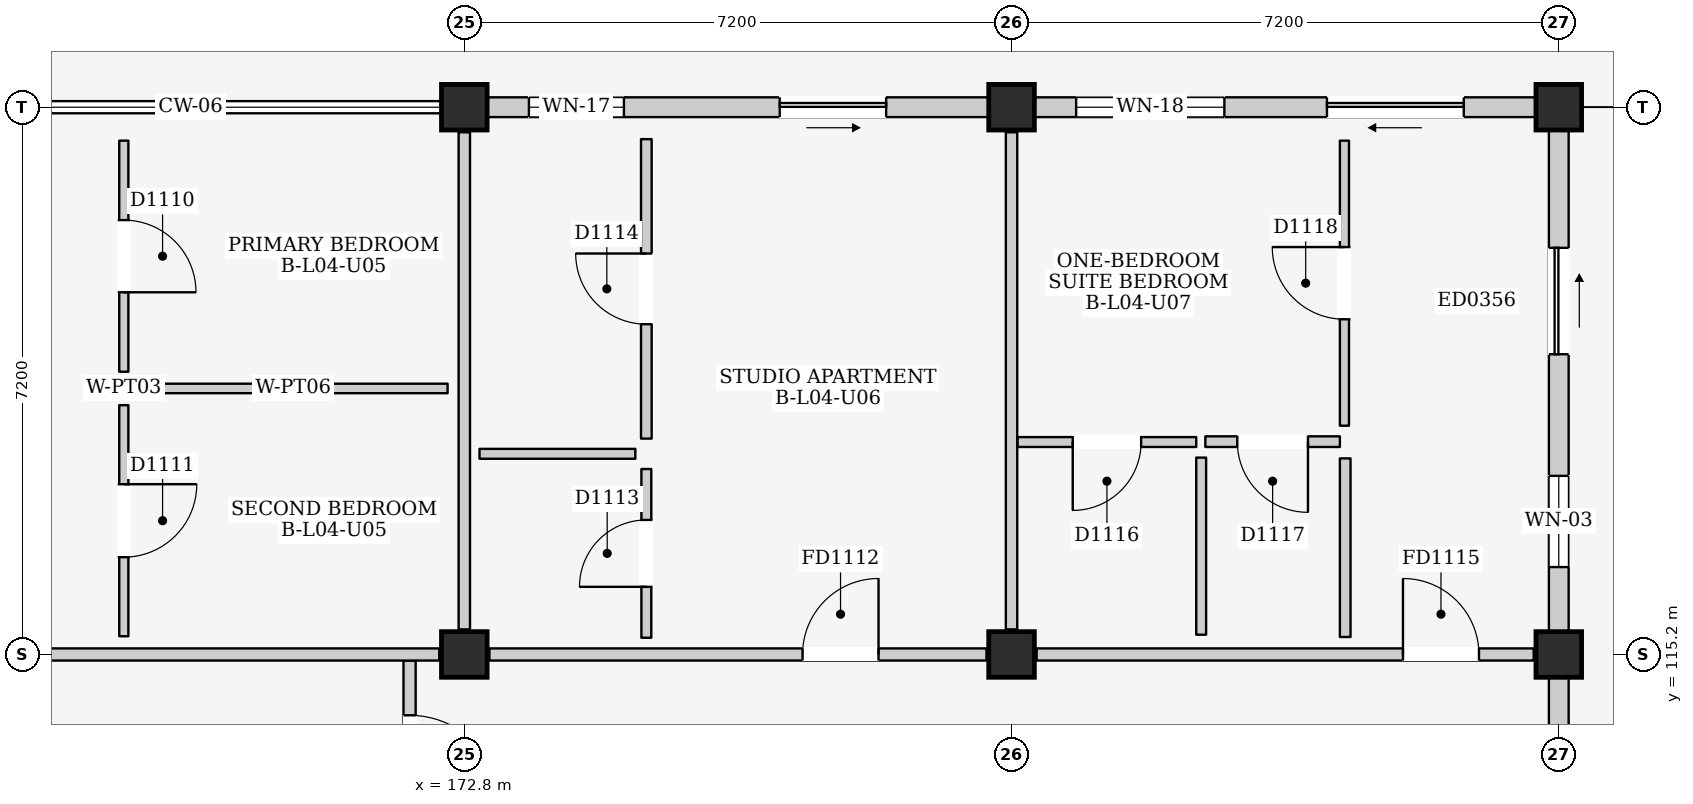
"""IFC4 building model, lengths in metres.
Left out: names, types, materials, properties, quantities, classifications, styles, units other than length and angle.
Written with IfcOpenShell. Run it as: python <this file> out.ifc"""

import sys

from ifc_helpers import new_model, si_unit, direction, frame, frame_2d, origin, origin_2d, place, context, subcontext, project, spatial, rectangle, extrude, element, fill, save


model = new_model("IFC4")
c1 = context("Model", 3, precision=1e-05, world=origin(), true_north=direction((0.0, 1.0)))
c2 = subcontext(c1, "Body", "Model", "MODEL_VIEW")
j1 = project(units=[si_unit("LENGTHUNIT", "METRE"), si_unit("PLANEANGLEUNIT", "RADIAN")], contexts=[c1])
p1 = place(None, origin())
s1 = spatial("IfcSite", under=j1, at=p1, CompositionType="ELEMENT")
p2 = place(p1, origin())
s2 = spatial("IfcBuilding", under=s1, at=p2, CompositionType="ELEMENT")
p3 = place(p2, frame((0.0, 0.0, 15.4)))
s3 = spatial("IfcBuildingStorey", under=s2, at=p3, CompositionType="ELEMENT", Elevation=15.4)
for number, where, z_axis, x_axis in (
    (1, (172.8, 115.2, 0.0), (0.0, 0.0, 1.0), (1.0, 0.0, 0.0)),
    (2, (172.8, 122.4, 0.0), (0.0, 0.0, 1.0), (1.0, 0.0, 0.0)),
    (3, (180.0, 115.2, 0.0), (0.0, 0.0, 1.0), (1.0, 0.0, 0.0)),
    (4, (180.0, 122.4, 0.0), (0.0, 0.0, 1.0), (1.0, 0.0, 0.0)),
    (5, (187.2, 115.2, 0.0), (0.0, 0.0, 1.0), (1.0, 0.0, 0.0)),
    (6, (187.2, 122.4, 0.0), (0.0, 0.0, 1.0), (1.0, 0.0, 0.0)),
):
    element("IfcColumn", number, at=place(p3, frame(where, z_axis=z_axis, x_axis=x_axis)), inside=s3, PredefinedType="COLUMN", context=c2, shape_type="SweptSolid", body=[
        extrude(rectangle(XDim=0.6, YDim=0.6, at=origin_2d()), origin(), (0.0, 0.0, 1.0), 3.2),
    ])
p4 = place(p3, frame((173.1, 122.4, 0.0), z_axis=(0.0, 0.0, 1.0), x_axis=(1.0, 0.0, 0.0)))
e7 = element("IfcWall", 7, at=p4, inside=s3, PredefinedType="ELEMENTEDWALL", context=c2, shape_type="SweptSolid", body=[
    extrude(rectangle(XDim=6.6, YDim=0.26, at=frame_2d((3.3, 0.0))), origin(), (0.0, 0.0, 1.0), 2.43),
])
p5 = place(p4, frame((3.85, 0.0, 0.0)))
e8 = element("IfcOpeningElement", 8, at=p5, cuts=e7, PredefinedType="OPENING", context=c2, shape_type="SweptSolid", body=[
    extrude(rectangle(XDim=1.4, YDim=2.1, at=frame_2d((0.7, 1.05))), frame((0.0, 0.145, 0.0), z_axis=(0.0, -1.0, 0.0), x_axis=(1.0, 0.0, 0.0)), (0.0, 0.0, 1.0), 0.29),
])
p6 = place(p4, frame((0.55, 0.0, 0.9)))
e9 = element("IfcOpeningElement", 9, at=p6, cuts=e7, PredefinedType="OPENING", context=c2, shape_type="SweptSolid", body=[
    extrude(rectangle(XDim=1.25, YDim=1.3, at=frame_2d((0.625, 0.65))), frame((0.0, 0.145, 0.0), z_axis=(0.0, -1.0, 0.0), x_axis=(1.0, 0.0, 0.0)), (0.0, 0.0, 1.0), 0.29),
])
p7 = place(p3, frame((187.2, 108.3, 0.0), z_axis=(0.0, 0.0, 1.0), x_axis=(0.0, 1.0, 0.0)))
e10 = element("IfcWall", 10, at=p7, inside=s3, PredefinedType="ELEMENTEDWALL", context=c2, shape_type="SweptSolid", body=[
    extrude(rectangle(XDim=6.6, YDim=0.26, at=frame_2d((3.3, 0.0))), origin(), (0.0, 0.0, 1.0), 2.43),
])
p8 = place(p7, frame((3.65, 0.0, 0.0)))
e11 = element("IfcOpeningElement", 11, at=p8, cuts=e10, PredefinedType="OPENING", context=c2, shape_type="SweptSolid", body=[
    extrude(rectangle(XDim=1.4, YDim=2.1, at=frame_2d((0.7, 1.05))), frame((0.0, 0.145, 0.0), z_axis=(0.0, -1.0, 0.0), x_axis=(1.0, 0.0, 0.0)), (0.0, 0.0, 1.0), 0.29),
])
p9 = place(p3, frame((180.3, 122.4, 0.0), z_axis=(0.0, 0.0, 1.0), x_axis=(1.0, 0.0, 0.0)))
e12 = element("IfcWall", 12, at=p9, inside=s3, PredefinedType="ELEMENTEDWALL", context=c2, shape_type="SweptSolid", body=[
    extrude(rectangle(XDim=6.6, YDim=0.26, at=frame_2d((3.3, 0.0))), origin(), (0.0, 0.0, 1.0), 2.43),
])
p10 = place(p9, frame((3.85, 0.0, 0.0)))
e13 = element("IfcOpeningElement", 13, at=p10, cuts=e12, PredefinedType="OPENING", context=c2, shape_type="SweptSolid", body=[
    extrude(rectangle(XDim=1.8, YDim=2.12, at=frame_2d((0.9, 1.06))), frame((0.0, 0.145, 0.0), z_axis=(0.0, -1.0, 0.0), x_axis=(1.0, 0.0, 0.0)), (0.0, 0.0, 1.0), 0.29),
])
p11 = place(p9, frame((0.55, 0.0, 0.76)))
e14 = element("IfcOpeningElement", 14, at=p11, cuts=e12, PredefinedType="OPENING", context=c2, shape_type="SweptSolid", body=[
    extrude(rectangle(XDim=1.95, YDim=1.55, at=frame_2d((0.975, 0.775))), frame((0.0, 0.145, 0.0), z_axis=(0.0, -1.0, 0.0), x_axis=(1.0, 0.0, 0.0)), (0.0, 0.0, 1.0), 0.29),
])
p12 = place(p3, frame((187.2, 115.5, 0.0), z_axis=(0.0, 0.0, 1.0), x_axis=(0.0, 1.0, 0.0)))
e15 = element("IfcWall", 15, at=p12, inside=s3, PredefinedType="ELEMENTEDWALL", context=c2, shape_type="SweptSolid", body=[
    extrude(rectangle(XDim=6.6, YDim=0.26, at=frame_2d((3.3, 0.0))), origin(), (0.0, 0.0, 1.0), 2.43),
])
p13 = place(p12, frame((3.65, 0.0, 0.0)))
e16 = element("IfcOpeningElement", 16, at=p13, cuts=e15, PredefinedType="OPENING", context=c2, shape_type="SweptSolid", body=[
    extrude(rectangle(XDim=1.4, YDim=2.1, at=frame_2d((0.7, 1.05))), frame((0.0, 0.145, 0.0), z_axis=(0.0, -1.0, 0.0), x_axis=(1.0, 0.0, 0.0)), (0.0, 0.0, 1.0), 0.29),
])
p14 = place(p12, frame((0.85, 0.0, 0.95)))
e17 = element("IfcOpeningElement", 17, at=p14, cuts=e15, PredefinedType="OPENING", context=c2, shape_type="SweptSolid", body=[
    extrude(rectangle(XDim=1.2, YDim=1.35, at=frame_2d((0.6, 0.675))), frame((0.0, 0.145, 0.0), z_axis=(0.0, -1.0, 0.0), x_axis=(1.0, 0.0, 0.0)), (0.0, 0.0, 1.0), 0.29),
])
p15 = place(p3, frame((172.08, 110.8, 0.0), z_axis=(0.0, 0.0, 1.0), x_axis=(0.0, 1.0, 0.0)))
e18 = element("IfcWall", 18, at=p15, inside=s3, PredefinedType="PARTITIONING", context=c2, shape_type="SweptSolid", body=[
    extrude(rectangle(XDim=4.32, YDim=0.16, at=frame_2d((2.16, 0.0))), origin(), (0.0, 0.0, 1.0), 2.95),
])
p16 = place(p15, frame((2.4, 0.0, 0.0)))
e19 = element("IfcOpeningElement", 19, at=p16, cuts=e18, PredefinedType="OPENING", context=c2, shape_type="SweptSolid", body=[
    extrude(rectangle(XDim=1.2, YDim=2.2, at=frame_2d((0.6, 1.1))), frame((0.0, 0.095, 0.0), z_axis=(0.0, -1.0, 0.0), x_axis=(1.0, 0.0, 0.0)), (0.0, 0.0, 1.0), 0.19),
])
p17 = place(p3, frame((165.93, 115.2, 0.0), z_axis=(0.0, 0.0, 1.0), x_axis=(1.0, 0.0, 0.0)))
e20 = element("IfcWall", 20, at=p17, inside=s3, PredefinedType="PARTITIONING", context=c2, shape_type="SweptSolid", body=[
    extrude(rectangle(XDim=6.54, YDim=0.16, at=frame_2d((3.27, 0.0))), origin(), (0.0, 0.0, 1.0), 2.335),
])
p18 = place(p3, frame((172.8, 115.53, 0.0), z_axis=(0.0, 0.0, 1.0), x_axis=(0.0, 1.0, 0.0)))
e21 = element("IfcWall", 21, at=p18, inside=s3, PredefinedType="PARTITIONING", context=c2, shape_type="SweptSolid", body=[
    extrude(rectangle(XDim=6.54, YDim=0.15, at=frame_2d((3.27, 0.0))), origin(), (0.0, 0.0, 1.0), 2.385),
])
p19 = place(p3, frame((168.32, 118.92, 0.0), z_axis=(0.0, 0.0, 1.0), x_axis=(0.0, 1.0, 0.0)))
e22 = element("IfcWall", 22, at=p19, inside=s3, PredefinedType="PARTITIONING", context=c2, shape_type="SweptSolid", body=[
    extrude(rectangle(XDim=3.04, YDim=0.12, at=frame_2d((1.52, 0.0))), origin(), (0.0, 0.0, 1.0), 2.95),
])
p20 = place(p19, frame((1.045, 0.0, 0.0)))
e23 = element("IfcOpeningElement", 23, at=p20, cuts=e22, PredefinedType="OPENING", context=c2, shape_type="SweptSolid", body=[
    extrude(rectangle(XDim=0.95, YDim=2.15, at=frame_2d((0.475, 1.075))), frame((0.0, 0.075, 0.0), z_axis=(0.0, -1.0, 0.0), x_axis=(1.0, 0.0, 0.0)), (0.0, 0.0, 1.0), 0.15),
])
p21 = place(p3, frame((168.52, 118.7, 0.0), z_axis=(0.0, 0.0, 1.0), x_axis=(1.0, 0.0, 0.0)))
e24 = element("IfcWall", 24, at=p21, inside=s3, PredefinedType="PARTITIONING", context=c2, shape_type="SweptSolid", body=[
    extrude(rectangle(XDim=4.06, YDim=0.125, at=frame_2d((2.03, 0.0))), origin(), (0.0, 0.0, 1.0), 2.95),
])
p22 = place(p3, frame((168.32, 115.44, 0.0), z_axis=(0.0, 0.0, 1.0), x_axis=(0.0, 1.0, 0.0)))
e25 = element("IfcWall", 25, at=p22, inside=s3, PredefinedType="PARTITIONING", context=c2, shape_type="SweptSolid", body=[
    extrude(rectangle(XDim=3.04, YDim=0.12, at=frame_2d((1.52, 0.0))), origin(), (0.0, 0.0, 1.0), 2.95),
])
p23 = place(p22, frame((1.04, 0.0, 0.0)))
e26 = element("IfcOpeningElement", 26, at=p23, cuts=e25, PredefinedType="OPENING", context=c2, shape_type="SweptSolid", body=[
    extrude(rectangle(XDim=0.96, YDim=2.15, at=frame_2d((0.48, 1.075))), frame((0.0, 0.075, 0.0), z_axis=(0.0, -1.0, 0.0), x_axis=(1.0, 0.0, 0.0)), (0.0, 0.0, 1.0), 0.15),
])
p24 = place(p3, frame((173.13, 115.2, 0.0), z_axis=(0.0, 0.0, 1.0), x_axis=(1.0, 0.0, 0.0)))
e27 = element("IfcWall", 27, at=p24, inside=s3, PredefinedType="PARTITIONING", context=c2, shape_type="SweptSolid", body=[
    extrude(rectangle(XDim=6.54, YDim=0.16, at=frame_2d((3.27, 0.0))), origin(), (0.0, 0.0, 1.0), 2.335),
])
p25 = place(p24, frame((4.12, 0.0, 0.0)))
e28 = element("IfcOpeningElement", 28, at=p25, cuts=e27, PredefinedType="OPENING", context=c2, shape_type="SweptSolid", body=[
    extrude(rectangle(XDim=1.0, YDim=2.15, at=frame_2d((0.5, 1.075))), frame((0.0, 0.095, 0.0), z_axis=(0.0, -1.0, 0.0), x_axis=(1.0, 0.0, 0.0)), (0.0, 0.0, 1.0), 0.19),
])
p26 = place(p3, frame((180.0, 115.53, 0.0), z_axis=(0.0, 0.0, 1.0), x_axis=(0.0, 1.0, 0.0)))
e29 = element("IfcWall", 29, at=p26, inside=s3, PredefinedType="PARTITIONING", context=c2, shape_type="SweptSolid", body=[
    extrude(rectangle(XDim=6.54, YDim=0.15, at=frame_2d((3.27, 0.0))), origin(), (0.0, 0.0, 1.0), 2.385),
])
p27 = place(p3, frame((173.0, 117.84, 0.0), z_axis=(0.0, 0.0, 1.0), x_axis=(1.0, 0.0, 0.0)))
e30 = element("IfcWall", 30, at=p27, inside=s3, PredefinedType="PARTITIONING", context=c2, shape_type="SweptSolid", body=[
    extrude(rectangle(XDim=2.05, YDim=0.13, at=frame_2d((1.025, 0.0))), origin(), (0.0, 0.0, 1.0), 2.95),
])
p28 = place(p3, frame((175.195, 115.42, 0.0), z_axis=(0.0, 0.0, 1.0), x_axis=(0.0, 1.0, 0.0)))
e31 = element("IfcWall", 31, at=p28, inside=s3, PredefinedType="PARTITIONING", context=c2, shape_type="SweptSolid", body=[
    extrude(rectangle(XDim=2.22, YDim=0.13, at=frame_2d((1.11, 0.0))), origin(), (0.0, 0.0, 1.0), 2.95),
])
p29 = place(p28, frame((0.67, 0.0, 0.0)))
e32 = element("IfcOpeningElement", 32, at=p29, cuts=e31, PredefinedType="OPENING", context=c2, shape_type="SweptSolid", body=[
    extrude(rectangle(XDim=0.88, YDim=2.1, at=frame_2d((0.44, 1.05))), frame((0.0, 0.08, 0.0), z_axis=(0.0, -1.0, 0.0), x_axis=(1.0, 0.0, 0.0)), (0.0, 0.0, 1.0), 0.16),
])
p30 = place(p3, frame((175.195, 118.04, 0.0), z_axis=(0.0, 0.0, 1.0), x_axis=(0.0, 1.0, 0.0)))
e33 = element("IfcWall", 33, at=p30, inside=s3, PredefinedType="PARTITIONING", context=c2, shape_type="SweptSolid", body=[
    extrude(rectangle(XDim=3.94, YDim=0.14, at=frame_2d((1.97, 0.0))), origin(), (0.0, 0.0, 1.0), 2.95),
])
p31 = place(p30, frame((1.505, 0.0, 0.0)))
e34 = element("IfcOpeningElement", 34, at=p31, cuts=e33, PredefinedType="OPENING", context=c2, shape_type="SweptSolid", body=[
    extrude(rectangle(XDim=0.93, YDim=2.14, at=frame_2d((0.465, 1.07))), frame((0.0, 0.085, 0.0), z_axis=(0.0, -1.0, 0.0), x_axis=(1.0, 0.0, 0.0)), (0.0, 0.0, 1.0), 0.17),
])
p32 = place(p3, frame((180.33, 115.2, 0.0), z_axis=(0.0, 0.0, 1.0), x_axis=(1.0, 0.0, 0.0)))
e35 = element("IfcWall", 35, at=p32, inside=s3, PredefinedType="PARTITIONING", context=c2, shape_type="SweptSolid", body=[
    extrude(rectangle(XDim=6.54, YDim=0.16, at=frame_2d((3.27, 0.0))), origin(), (0.0, 0.0, 1.0), 2.335),
])
p33 = place(p32, frame((4.82, 0.0, 0.0)))
e36 = element("IfcOpeningElement", 36, at=p33, cuts=e35, PredefinedType="OPENING", context=c2, shape_type="SweptSolid", body=[
    extrude(rectangle(XDim=1.0, YDim=2.15, at=frame_2d((0.5, 1.075))), frame((0.0, 0.095, 0.0), z_axis=(0.0, -1.0, 0.0), x_axis=(1.0, 0.0, 0.0)), (0.0, 0.0, 1.0), 0.19),
])
p34 = place(p3, frame((180.08, 117.995, 0.0), z_axis=(0.0, 0.0, 1.0), x_axis=(1.0, 0.0, 0.0)))
e37 = element("IfcWall", 37, at=p34, inside=s3, PredefinedType="PARTITIONING", context=c2, shape_type="SweptSolid", body=[
    extrude(rectangle(XDim=2.35, YDim=0.13, at=frame_2d((1.175, 0.0))), origin(), (0.0, 0.0, 1.0), 2.95),
])
p35 = place(p34, frame((0.725, 0.0, 0.0)))
e38 = element("IfcOpeningElement", 38, at=p35, cuts=e37, PredefinedType="OPENING", context=c2, shape_type="SweptSolid", body=[
    extrude(rectangle(XDim=0.9, YDim=2.1, at=frame_2d((0.45, 1.05))), frame((0.0, 0.08, 0.0), z_axis=(0.0, -1.0, 0.0), x_axis=(1.0, 0.0, 0.0)), (0.0, 0.0, 1.0), 0.16),
])
p36 = place(p3, frame((182.495, 115.46, 0.0), z_axis=(0.0, 0.0, 1.0), x_axis=(0.0, 1.0, 0.0)))
e39 = element("IfcWall", 39, at=p36, inside=s3, PredefinedType="PARTITIONING", context=c2, shape_type="SweptSolid", body=[
    extrude(rectangle(XDim=2.33, YDim=0.13, at=frame_2d((1.165, 0.0))), origin(), (0.0, 0.0, 1.0), 2.95),
])
p37 = place(p3, frame((182.55, 118.0, 0.0), z_axis=(0.0, 0.0, 1.0), x_axis=(1.0, 0.0, 0.0)))
e40 = element("IfcWall", 40, at=p37, inside=s3, PredefinedType="PARTITIONING", context=c2, shape_type="SweptSolid", body=[
    extrude(rectangle(XDim=1.77, YDim=0.14, at=frame_2d((0.885, 0.0))), origin(), (0.0, 0.0, 1.0), 2.95),
])
p38 = place(p37, frame((0.42, 0.0, 0.0)))
e41 = element("IfcOpeningElement", 41, at=p38, cuts=e40, PredefinedType="OPENING", context=c2, shape_type="SweptSolid", body=[
    extrude(rectangle(XDim=0.93, YDim=2.14, at=frame_2d((0.465, 1.07))), frame((0.0, 0.085, 0.0), z_axis=(0.0, -1.0, 0.0), x_axis=(1.0, 0.0, 0.0)), (0.0, 0.0, 1.0), 0.17),
])
p39 = place(p3, frame((184.39, 115.43, 0.0), z_axis=(0.0, 0.0, 1.0), x_axis=(0.0, 1.0, 0.0)))
e42 = element("IfcWall", 42, at=p39, inside=s3, PredefinedType="PARTITIONING", context=c2, shape_type="SweptSolid", body=[
    extrude(rectangle(XDim=2.35, YDim=0.14, at=frame_2d((1.175, 0.0))), origin(), (0.0, 0.0, 1.0), 2.95),
])
p40 = place(p3, frame((184.38, 118.21, 0.0), z_axis=(0.0, 0.0, 1.0), x_axis=(0.0, 1.0, 0.0)))
e43 = element("IfcWall", 43, at=p40, inside=s3, PredefinedType="PARTITIONING", context=c2, shape_type="SweptSolid", body=[
    extrude(rectangle(XDim=3.75, YDim=0.12, at=frame_2d((1.875, 0.0))), origin(), (0.0, 0.0, 1.0), 2.95),
])
p41 = place(p40, frame((1.4, 0.0, 0.0)))
e44 = element("IfcOpeningElement", 44, at=p41, cuts=e43, PredefinedType="OPENING", context=c2, shape_type="SweptSolid", body=[
    extrude(rectangle(XDim=0.95, YDim=2.15, at=frame_2d((0.475, 1.075))), frame((0.0, 0.075, 0.0), z_axis=(0.0, -1.0, 0.0), x_axis=(1.0, 0.0, 0.0)), (0.0, 0.0, 1.0), 0.15),
])
p42 = place(p5, frame((1.4, 0.0, 0.0), z_axis=(0.0, 0.0, 1.0), x_axis=(-1.0, 0.0, 0.0)))
e45 = element("IfcDoor", 45, at=p42, inside=s3, OperationType="SLIDING_TO_RIGHT", PredefinedType="DOOR", context=c2, shape_type="SweptSolid", body=[
    extrude(rectangle(XDim=1.4, YDim=2.1, at=frame_2d((0.7, 1.05))), frame((0.0, 0.025, 0.0), z_axis=(0.0, -1.0, 0.0), x_axis=(1.0, 0.0, 0.0)), (0.0, 0.0, 1.0), 0.05),
])
fill(e8, e45)
p43 = place(p6, origin())
e46 = element("IfcWindow", 46, at=p43, inside=s3, PartitioningType="SINGLE_PANEL", PredefinedType="WINDOW", context=c2, shape_type="SweptSolid", body=[
    extrude(rectangle(XDim=1.25, YDim=1.3, at=frame_2d((0.625, 0.65))), frame((0.0, 0.03, 0.0), z_axis=(0.0, -1.0, 0.0), x_axis=(1.0, 0.0, 0.0)), (0.0, 0.0, 1.0), 0.06),
])
fill(e9, e46)
p44 = place(p10, frame((1.8, 0.0, 0.0), z_axis=(0.0, 0.0, 1.0), x_axis=(-1.0, 0.0, 0.0)))
e47 = element("IfcDoor", 47, at=p44, inside=s3, OperationType="SLIDING_TO_LEFT", PredefinedType="DOOR", context=c2, shape_type="SweptSolid", body=[
    extrude(rectangle(XDim=1.8, YDim=2.12, at=frame_2d((0.9, 1.06))), frame((0.0, 0.025, 0.0), z_axis=(0.0, -1.0, 0.0), x_axis=(1.0, 0.0, 0.0)), (0.0, 0.0, 1.0), 0.05),
])
fill(e13, e47)
p45 = place(p11, origin())
e48 = element("IfcWindow", 48, at=p45, inside=s3, PartitioningType="DOUBLE_PANEL_VERTICAL", PredefinedType="WINDOW", context=c2, shape_type="SweptSolid", body=[
    extrude(rectangle(XDim=1.95, YDim=1.55, at=frame_2d((0.975, 0.775))), frame((0.0, 0.03, 0.0), z_axis=(0.0, -1.0, 0.0), x_axis=(1.0, 0.0, 0.0)), (0.0, 0.0, 1.0), 0.06),
])
fill(e14, e48)
p46 = place(p13, frame((1.4, 0.0, 0.0), z_axis=(0.0, 0.0, 1.0), x_axis=(-1.0, 0.0, 0.0)))
e49 = element("IfcDoor", 49, at=p46, inside=s3, OperationType="SLIDING_TO_RIGHT", PredefinedType="DOOR", context=c2, shape_type="SweptSolid", body=[
    extrude(rectangle(XDim=1.4, YDim=2.1, at=frame_2d((0.7, 1.05))), frame((0.0, 0.025, 0.0), z_axis=(0.0, -1.0, 0.0), x_axis=(1.0, 0.0, 0.0)), (0.0, 0.0, 1.0), 0.05),
])
fill(e16, e49)
p47 = place(p14, origin())
e50 = element("IfcWindow", 50, at=p47, inside=s3, PartitioningType="SINGLE_PANEL", PredefinedType="WINDOW", context=c2, shape_type="SweptSolid", body=[
    extrude(rectangle(XDim=1.2, YDim=1.35, at=frame_2d((0.6, 0.675))), frame((0.0, 0.03, 0.0), z_axis=(0.0, -1.0, 0.0), x_axis=(1.0, 0.0, 0.0)), (0.0, 0.0, 1.0), 0.06),
])
fill(e17, e50)
p48 = place(p16, frame((1.2, 0.0, 0.0), z_axis=(0.0, 0.0, 1.0), x_axis=(-1.0, 0.0, 0.0)))
e51 = element("IfcDoor", 51, at=p48, inside=s3, OperationType="SINGLE_SWING_RIGHT", PredefinedType="DOOR", context=c2, shape_type="SweptSolid", body=[
    extrude(rectangle(XDim=1.2, YDim=2.2, at=frame_2d((0.6, 1.1))), frame((0.0, 0.025, 0.0), z_axis=(0.0, -1.0, 0.0), x_axis=(1.0, 0.0, 0.0)), (0.0, 0.0, 1.0), 0.05),
])
fill(e19, e51)
p49 = place(p20, frame((0.95, 0.0, 0.0), z_axis=(0.0, 0.0, 1.0), x_axis=(-1.0, 0.0, 0.0)))
e52 = element("IfcDoor", 52, at=p49, inside=s3, OperationType="SINGLE_SWING_RIGHT", PredefinedType="DOOR", context=c2, shape_type="SweptSolid", body=[
    extrude(rectangle(XDim=0.95, YDim=2.15, at=frame_2d((0.475, 1.075))), frame((0.0, 0.025, 0.0), z_axis=(0.0, -1.0, 0.0), x_axis=(1.0, 0.0, 0.0)), (0.0, 0.0, 1.0), 0.05),
])
fill(e23, e52)
p50 = place(p23, frame((0.96, 0.0, 0.0), z_axis=(0.0, 0.0, 1.0), x_axis=(-1.0, 0.0, 0.0)))
e53 = element("IfcDoor", 53, at=p50, inside=s3, OperationType="SINGLE_SWING_LEFT", PredefinedType="DOOR", context=c2, shape_type="SweptSolid", body=[
    extrude(rectangle(XDim=0.96, YDim=2.15, at=frame_2d((0.48, 1.075))), frame((0.0, 0.025, 0.0), z_axis=(0.0, -1.0, 0.0), x_axis=(1.0, 0.0, 0.0)), (0.0, 0.0, 1.0), 0.05),
])
fill(e26, e53)
p51 = place(p25, origin())
e54 = element("IfcDoor", 54, at=p51, inside=s3, OperationType="SINGLE_SWING_RIGHT", PredefinedType="DOOR", context=c2, shape_type="SweptSolid", body=[
    extrude(rectangle(XDim=1.0, YDim=2.15, at=frame_2d((0.5, 1.075))), frame((0.0, 0.025, 0.0), z_axis=(0.0, -1.0, 0.0), x_axis=(1.0, 0.0, 0.0)), (0.0, 0.0, 1.0), 0.05),
])
fill(e28, e54)
p52 = place(p29, origin())
e55 = element("IfcDoor", 55, at=p52, inside=s3, OperationType="SINGLE_SWING_LEFT", PredefinedType="DOOR", context=c2, shape_type="SweptSolid", body=[
    extrude(rectangle(XDim=0.88, YDim=2.1, at=frame_2d((0.44, 1.05))), frame((0.0, 0.025, 0.0), z_axis=(0.0, -1.0, 0.0), x_axis=(1.0, 0.0, 0.0)), (0.0, 0.0, 1.0), 0.05),
])
fill(e32, e55)
p53 = place(p31, origin())
e56 = element("IfcDoor", 56, at=p53, inside=s3, OperationType="SINGLE_SWING_RIGHT", PredefinedType="DOOR", context=c2, shape_type="SweptSolid", body=[
    extrude(rectangle(XDim=0.93, YDim=2.14, at=frame_2d((0.465, 1.07))), frame((0.0, 0.025, 0.0), z_axis=(0.0, -1.0, 0.0), x_axis=(1.0, 0.0, 0.0)), (0.0, 0.0, 1.0), 0.05),
])
fill(e34, e56)
p54 = place(p33, origin())
e57 = element("IfcDoor", 57, at=p54, inside=s3, OperationType="SINGLE_SWING_LEFT", PredefinedType="DOOR", context=c2, shape_type="SweptSolid", body=[
    extrude(rectangle(XDim=1.0, YDim=2.15, at=frame_2d((0.5, 1.075))), frame((0.0, 0.025, 0.0), z_axis=(0.0, -1.0, 0.0), x_axis=(1.0, 0.0, 0.0)), (0.0, 0.0, 1.0), 0.05),
])
fill(e36, e57)
p55 = place(p35, frame((0.9, 0.0, 0.0), z_axis=(0.0, 0.0, 1.0), x_axis=(-1.0, 0.0, 0.0)))
e58 = element("IfcDoor", 58, at=p55, inside=s3, OperationType="SINGLE_SWING_RIGHT", PredefinedType="DOOR", context=c2, shape_type="SweptSolid", body=[
    extrude(rectangle(XDim=0.9, YDim=2.1, at=frame_2d((0.45, 1.05))), frame((0.0, 0.025, 0.0), z_axis=(0.0, -1.0, 0.0), x_axis=(1.0, 0.0, 0.0)), (0.0, 0.0, 1.0), 0.05),
])
fill(e38, e58)
p56 = place(p38, frame((0.93, 0.0, 0.0), z_axis=(0.0, 0.0, 1.0), x_axis=(-1.0, 0.0, 0.0)))
e59 = element("IfcDoor", 59, at=p56, inside=s3, OperationType="SINGLE_SWING_LEFT", PredefinedType="DOOR", context=c2, shape_type="SweptSolid", body=[
    extrude(rectangle(XDim=0.93, YDim=2.14, at=frame_2d((0.465, 1.07))), frame((0.0, 0.025, 0.0), z_axis=(0.0, -1.0, 0.0), x_axis=(1.0, 0.0, 0.0)), (0.0, 0.0, 1.0), 0.05),
])
fill(e41, e59)
p57 = place(p41, origin())
e60 = element("IfcDoor", 60, at=p57, inside=s3, OperationType="SINGLE_SWING_RIGHT", PredefinedType="DOOR", context=c2, shape_type="SweptSolid", body=[
    extrude(rectangle(XDim=0.95, YDim=2.15, at=frame_2d((0.475, 1.075))), frame((0.0, 0.025, 0.0), z_axis=(0.0, -1.0, 0.0), x_axis=(1.0, 0.0, 0.0)), (0.0, 0.0, 1.0), 0.05),
])
fill(e44, e60)
save(model, sys.argv[1])
